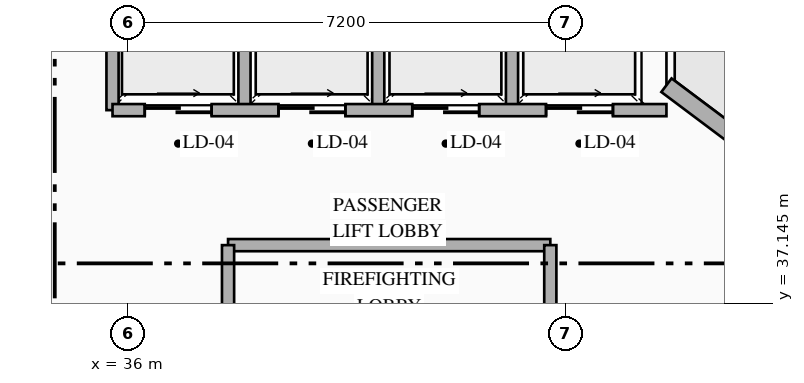
"""IFC4 building model, lengths in metres.
Left out: names, types, materials, properties, quantities, classifications, styles, units other than length and angle.
Written with IfcOpenShell. Run it as: python <this file> out.ifc"""

import sys

from ifc_helpers import new_model, si_unit, direction, frame, frame_2d, origin, place, context, subcontext, project, spatial, rectangle, extrude, element, fill, save


model = new_model("IFC4")
c1 = context("Model", 3, precision=1e-05, world=origin(), true_north=direction((0.0, 1.0)))
c2 = subcontext(c1, "Body", "Model", "MODEL_VIEW")
j1 = project(units=[si_unit("LENGTHUNIT", "METRE"), si_unit("PLANEANGLEUNIT", "RADIAN")], contexts=[c1])
p1 = place(None, origin())
s1 = spatial("IfcSite", under=j1, at=p1, CompositionType="ELEMENT")
p2 = place(p1, origin())
s2 = spatial("IfcBuilding", under=s1, at=p2, CompositionType="ELEMENT")
p3 = place(p2, frame((0.0, 0.0, 216.75)))
s3 = spatial("IfcBuildingStorey", under=s2, at=p3, CompositionType="ELEMENT", Elevation=216.75)
p4 = place(p3, frame((44.86, 40.73, 0.0), z_axis=(0.0, 0.0, 1.0), x_axis=(0.800007624502, -0.599989833863, 0.0)))
e1 = element("IfcWall", 1, at=p4, inside=s3, PredefinedType="STANDARD", context=c2, shape_type="SweptSolid", body=[
    extrude(rectangle(XDim=19.212, YDim=0.28, at=frame_2d((9.606, 0.0))), origin(), (0.0, 0.0, 1.0), 3.35),
])
p5 = place(p4, frame((1.755, 0.0, 0.0)))
e2 = element("IfcOpeningElement", 2, at=p5, cuts=e1, PredefinedType="OPENING", context=c2, shape_type="SweptSolid", body=[
    extrude(rectangle(XDim=1.1, YDim=2.2, at=frame_2d((0.55, 1.1))), frame((0.0, 0.15, 0.0), z_axis=(0.0, -1.0, 0.0), x_axis=(1.0, 0.0, 0.0)), (0.0, 0.0, 1.0), 0.3),
])
p6 = place(p4, frame((13.509, 0.0, 0.85)))
e3 = element("IfcOpeningElement", 3, at=p6, cuts=e1, PredefinedType="OPENING", context=c2, shape_type="SweptSolid", body=[
    extrude(rectangle(XDim=1.8, YDim=2.1, at=frame_2d((0.9, 1.05))), frame((0.0, 0.15, 0.0), z_axis=(0.0, -1.0, 0.0), x_axis=(1.0, 0.0, 0.0)), (0.0, 0.0, 1.0), 0.3),
])
p7 = place(p3, frame((37.65, 38.1, 0.0), z_axis=(0.0, 0.0, 1.0), x_axis=(1.0, 0.0, 0.0)))
e4 = element("IfcWall", 4, at=p7, inside=s3, PredefinedType="STANDARD", context=c2, shape_type="SweptSolid", body=[
    extrude(rectangle(XDim=5.3, YDim=0.2, at=frame_2d((2.65, 0.0))), origin(), (0.0, 0.0, 1.0), 3.35),
])
p8 = place(p3, frame((42.95, 35.12, 0.0), z_axis=(0.0, 0.0, 1.0), x_axis=(0.0, 1.0, 0.0)))
e5 = element("IfcWall", 5, at=p8, inside=s3, PredefinedType="STANDARD", context=c2, shape_type="SweptSolid", body=[
    extrude(rectangle(XDim=2.98, YDim=0.2, at=frame_2d((1.49, 0.0))), origin(), (0.0, 0.0, 1.0), 3.35),
])
p9 = place(p3, frame((37.65, 35.12, 0.0), z_axis=(0.0, 0.0, 1.0), x_axis=(0.0, 1.0, 0.0)))
e6 = element("IfcWall", 6, at=p9, inside=s3, PredefinedType="STANDARD", context=c2, shape_type="SweptSolid", body=[
    extrude(rectangle(XDim=2.98, YDim=0.2, at=frame_2d((1.49, 0.0))), origin(), (0.0, 0.0, 1.0), 3.35),
])
p10 = place(p9, frame((0.99, 0.0, 0.0)))
e7 = element("IfcOpeningElement", 7, at=p10, cuts=e6, PredefinedType="OPENING", context=c2, shape_type="SweptSolid", body=[
    extrude(rectangle(XDim=1.0, YDim=2.2, at=frame_2d((0.5, 1.1))), frame((0.0, 0.11, 0.0), z_axis=(0.0, -1.0, 0.0), x_axis=(1.0, 0.0, 0.0)), (0.0, 0.0, 1.0), 0.22),
])
for number, where, z_axis, x_axis in (
    (8, (35.75, 40.32, 0.0), (0.0, 0.0, 1.0), (0.0, 1.0, 0.0)),
    (9, (37.92, 40.32, 0.0), (0.0, 0.0, 1.0), (0.0, 1.0, 0.0)),
    (10, (40.12, 40.32, 0.0), (0.0, 0.0, 1.0), (0.0, 1.0, 0.0)),
    (11, (42.32, 40.32, 0.0), (0.0, 0.0, 1.0), (0.0, 1.0, 0.0)),
):
    element("IfcWall", number, at=place(p3, frame(where, z_axis=z_axis, x_axis=x_axis)), inside=s3, PredefinedType="STANDARD", context=c2, shape_type="SweptSolid", body=[
        extrude(rectangle(XDim=2.16, YDim=0.2, at=frame_2d((1.08, 0.0))), origin(), (0.0, 0.0, 1.0), 3.35),
    ])
p11 = place(p3, frame((35.75, 40.32, 0.0), z_axis=(0.0, 0.0, 1.0), x_axis=(1.0, 0.0, 0.0)))
e12 = element("IfcWall", 12, at=p11, inside=s3, PredefinedType="STANDARD", context=c2, shape_type="SweptSolid", body=[
    extrude(rectangle(XDim=9.11, YDim=0.2, at=frame_2d((4.555, 0.0))), origin(), (0.0, 0.0, 1.0), 3.35),
])
p12 = place(p11, frame((0.53, 0.0, 0.0)))
e13 = element("IfcOpeningElement", 13, at=p12, cuts=e12, PredefinedType="OPENING", context=c2, shape_type="SweptSolid", body=[
    extrude(rectangle(XDim=1.1, YDim=2.18, at=frame_2d((0.55, 1.09))), frame((0.0, 0.11, 0.0), z_axis=(0.0, -1.0, 0.0), x_axis=(1.0, 0.0, 0.0)), (0.0, 0.0, 1.0), 0.22),
])
p13 = place(p11, frame((2.73, 0.0, 0.0)))
e14 = element("IfcOpeningElement", 14, at=p13, cuts=e12, PredefinedType="OPENING", context=c2, shape_type="SweptSolid", body=[
    extrude(rectangle(XDim=1.1, YDim=2.18, at=frame_2d((0.55, 1.09))), frame((0.0, 0.11, 0.0), z_axis=(0.0, -1.0, 0.0), x_axis=(1.0, 0.0, 0.0)), (0.0, 0.0, 1.0), 0.22),
])
p14 = place(p11, frame((4.93, 0.0, 0.0)))
e15 = element("IfcOpeningElement", 15, at=p14, cuts=e12, PredefinedType="OPENING", context=c2, shape_type="SweptSolid", body=[
    extrude(rectangle(XDim=1.1, YDim=2.18, at=frame_2d((0.55, 1.09))), frame((0.0, 0.11, 0.0), z_axis=(0.0, -1.0, 0.0), x_axis=(1.0, 0.0, 0.0)), (0.0, 0.0, 1.0), 0.22),
])
p15 = place(p11, frame((7.13, 0.0, 0.0)))
e16 = element("IfcOpeningElement", 16, at=p15, cuts=e12, PredefinedType="OPENING", context=c2, shape_type="SweptSolid", body=[
    extrude(rectangle(XDim=1.1, YDim=2.18, at=frame_2d((0.55, 1.09))), frame((0.0, 0.11, 0.0), z_axis=(0.0, -1.0, 0.0), x_axis=(1.0, 0.0, 0.0)), (0.0, 0.0, 1.0), 0.22),
])
p16 = place(p3, frame((43.48, 31.773, 0.0), z_axis=(0.0, 0.0, 1.0), x_axis=(0.599971041729, 0.800021717885, 0.0)))
e17 = element("IfcWall", 17, at=p16, inside=s3, PredefinedType="PARTITIONING", context=c2, shape_type="SweptSolid", body=[
    extrude(rectangle(XDim=8.094, YDim=0.15, at=frame_2d((4.047, 0.0))), origin(), (0.0, 0.0, 1.0), 3.35),
])
p17 = place(p12, origin())
e18 = element("IfcDoor", 18, at=p17, inside=s3, OperationType="SLIDING_TO_RIGHT", PredefinedType="USERDEFINED", context=c2, shape_type="SweptSolid", body=[
    extrude(rectangle(XDim=1.1, YDim=2.18, at=frame_2d((0.55, 1.09))), frame((0.0, 0.025, 0.0), z_axis=(0.0, -1.0, 0.0), x_axis=(1.0, 0.0, 0.0)), (0.0, 0.0, 1.0), 0.05),
])
fill(e13, e18)
p18 = place(p13, origin())
e19 = element("IfcDoor", 19, at=p18, inside=s3, OperationType="SLIDING_TO_RIGHT", PredefinedType="USERDEFINED", context=c2, shape_type="SweptSolid", body=[
    extrude(rectangle(XDim=1.1, YDim=2.18, at=frame_2d((0.55, 1.09))), frame((0.0, 0.025, 0.0), z_axis=(0.0, -1.0, 0.0), x_axis=(1.0, 0.0, 0.0)), (0.0, 0.0, 1.0), 0.05),
])
fill(e14, e19)
p19 = place(p14, origin())
e20 = element("IfcDoor", 20, at=p19, inside=s3, OperationType="SLIDING_TO_RIGHT", PredefinedType="USERDEFINED", context=c2, shape_type="SweptSolid", body=[
    extrude(rectangle(XDim=1.1, YDim=2.18, at=frame_2d((0.55, 1.09))), frame((0.0, 0.025, 0.0), z_axis=(0.0, -1.0, 0.0), x_axis=(1.0, 0.0, 0.0)), (0.0, 0.0, 1.0), 0.05),
])
fill(e15, e20)
p20 = place(p15, origin())
e21 = element("IfcDoor", 21, at=p20, inside=s3, OperationType="SLIDING_TO_RIGHT", PredefinedType="USERDEFINED", context=c2, shape_type="SweptSolid", body=[
    extrude(rectangle(XDim=1.1, YDim=2.18, at=frame_2d((0.55, 1.09))), frame((0.0, 0.025, 0.0), z_axis=(0.0, -1.0, 0.0), x_axis=(1.0, 0.0, 0.0)), (0.0, 0.0, 1.0), 0.05),
])
fill(e16, e21)
save(model, sys.argv[1])
